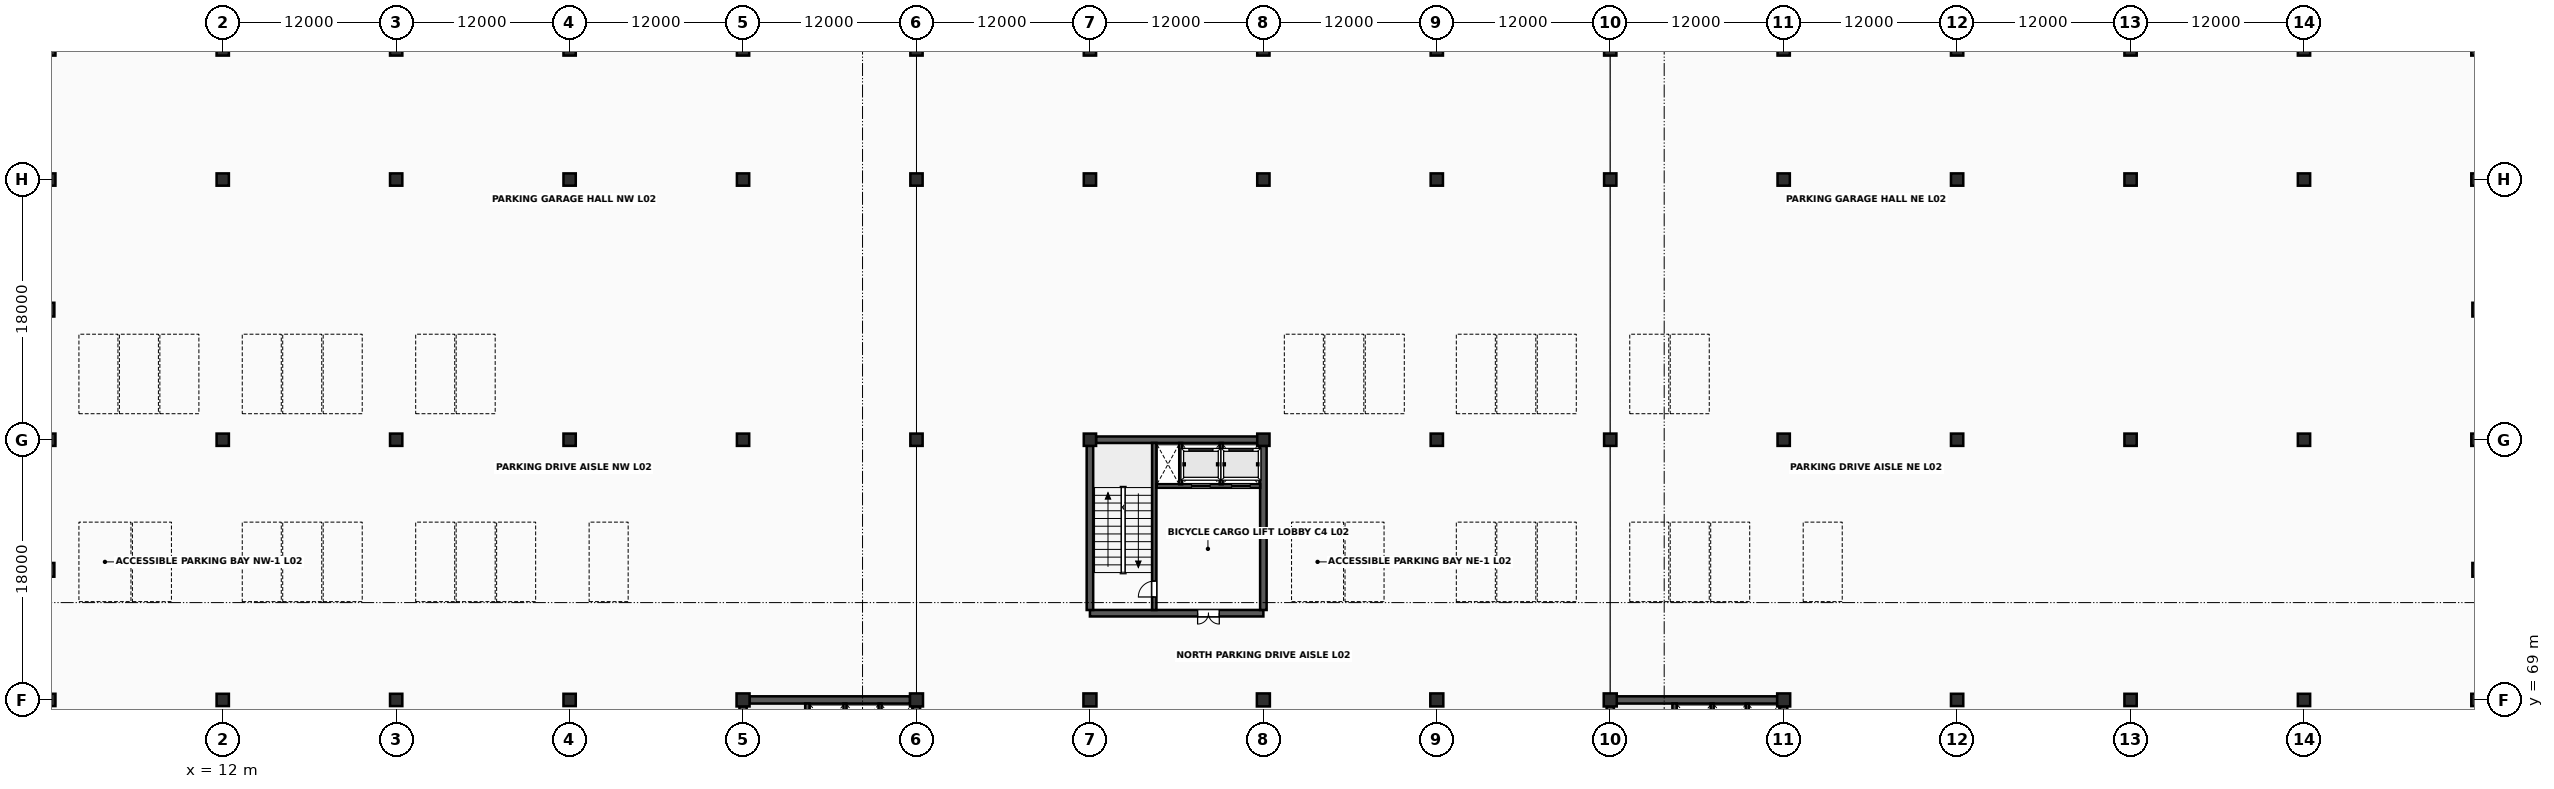
"""IFC4 building model, lengths in metres.
Left out: names, types, materials, properties, quantities, classifications, styles, units other than length and angle.
Written with IfcOpenShell. Run it as: python <this file> out.ifc"""

import sys

from ifc_helpers import new_model, si_unit, direction, frame, frame_2d, origin, origin_2d, place, context, subcontext, project, spatial, rectangle, extrude, element, fill, save


model = new_model("IFC4")
c1 = context("Model", 3, precision=1e-05, world=origin(), true_north=direction((0.0, 1.0)))
c2 = subcontext(c1, "Body", "Model", "MODEL_VIEW")
j1 = project(units=[si_unit("LENGTHUNIT", "METRE"), si_unit("PLANEANGLEUNIT", "RADIAN")], contexts=[c1])
p1 = place(None, origin())
s1 = spatial("IfcSite", under=j1, at=p1, CompositionType="ELEMENT")
p2 = place(p1, origin())
s2 = spatial("IfcBuilding", under=s1, at=p2, CompositionType="ELEMENT")
p3 = place(p2, frame((0.0, 0.0, 9.6)))
s3 = spatial("IfcBuildingStorey", under=s2, at=p3, CompositionType="ELEMENT", Elevation=9.6)
for number, where, z_axis, x_axis in (
    (1, (0.0, 69.0, 0.0), (0.0, 0.0, 1.0), (1.0, 0.0, 0.0)),
    (2, (0.0, 87.0, 0.0), (0.0, 0.0, 1.0), (1.0, 0.0, 0.0)),
    (3, (0.0, 105.0, 0.0), (0.0, 0.0, 1.0), (1.0, 0.0, 0.0)),
    (4, (0.0, 114.0, 0.0), (0.0, 0.0, 1.0), (1.0, 0.0, 0.0)),
    (5, (12.0, 69.0, 0.0), (0.0, 0.0, 1.0), (1.0, 0.0, 0.0)),
    (6, (12.0, 87.0, 0.0), (0.0, 0.0, 1.0), (1.0, 0.0, 0.0)),
    (7, (12.0, 105.0, 0.0), (0.0, 0.0, 1.0), (1.0, 0.0, 0.0)),
    (8, (12.0, 114.0, 0.0), (0.0, 0.0, 1.0), (1.0, 0.0, 0.0)),
    (9, (24.0, 69.0, 0.0), (0.0, 0.0, 1.0), (1.0, 0.0, 0.0)),
    (10, (24.0, 87.0, 0.0), (0.0, 0.0, 1.0), (1.0, 0.0, 0.0)),
    (11, (24.0, 105.0, 0.0), (0.0, 0.0, 1.0), (1.0, 0.0, 0.0)),
    (12, (24.0, 114.0, 0.0), (0.0, 0.0, 1.0), (1.0, 0.0, 0.0)),
    (13, (36.0, 69.0, 0.0), (0.0, 0.0, 1.0), (1.0, 0.0, 0.0)),
    (14, (36.0, 87.0, 0.0), (0.0, 0.0, 1.0), (1.0, 0.0, 0.0)),
    (15, (36.0, 105.0, 0.0), (0.0, 0.0, 1.0), (1.0, 0.0, 0.0)),
    (16, (36.0, 114.0, 0.0), (0.0, 0.0, 1.0), (1.0, 0.0, 0.0)),
):
    element("IfcColumn", number, at=place(p3, frame(where, z_axis=z_axis, x_axis=x_axis)), inside=s3, PredefinedType="COLUMN", context=c2, shape_type="SweptSolid", body=[
        extrude(rectangle(XDim=0.85, YDim=0.85, at=origin_2d()), origin(), (0.0, 0.0, 1.0), 3.8),
    ])
p4 = place(p3, frame((48.0, 69.0, 0.0), z_axis=(0.0, 0.0, 1.0), x_axis=(1.0, 0.0, 0.0)))
e17 = element("IfcColumn", 17, at=p4, inside=s3, PredefinedType="COLUMN", context=c2, shape_type="SweptSolid", body=[
    extrude(rectangle(XDim=0.9, YDim=0.9, at=origin_2d()), origin(), (0.0, 0.0, 1.0), 3.8),
])
for number, where, z_axis, x_axis in (
    (18, (48.0, 87.0, 0.0), (0.0, 0.0, 1.0), (1.0, 0.0, 0.0)),
    (19, (48.0, 105.0, 0.0), (0.0, 0.0, 1.0), (1.0, 0.0, 0.0)),
    (20, (48.0, 114.0, 0.0), (0.0, 0.0, 1.0), (1.0, 0.0, 0.0)),
):
    element("IfcColumn", number, at=place(p3, frame(where, z_axis=z_axis, x_axis=x_axis)), inside=s3, PredefinedType="COLUMN", context=c2, shape_type="SweptSolid", body=[
        extrude(rectangle(XDim=0.85, YDim=0.85, at=origin_2d()), origin(), (0.0, 0.0, 1.0), 3.8),
    ])
p5 = place(p3, frame((60.0, 69.0, 0.0), z_axis=(0.0, 0.0, 1.0), x_axis=(1.0, 0.0, 0.0)))
e21 = element("IfcColumn", 21, at=p5, inside=s3, PredefinedType="COLUMN", context=c2, shape_type="SweptSolid", body=[
    extrude(rectangle(XDim=0.9, YDim=0.9, at=origin_2d()), origin(), (0.0, 0.0, 1.0), 3.8),
])
for number, where, z_axis, x_axis in (
    (22, (60.0, 87.0, 0.0), (0.0, 0.0, 1.0), (1.0, 0.0, 0.0)),
    (23, (60.0, 105.0, 0.0), (0.0, 0.0, 1.0), (1.0, 0.0, 0.0)),
    (24, (60.0, 114.0, 0.0), (0.0, 0.0, 1.0), (1.0, 0.0, 0.0)),
):
    element("IfcColumn", number, at=place(p3, frame(where, z_axis=z_axis, x_axis=x_axis)), inside=s3, PredefinedType="COLUMN", context=c2, shape_type="SweptSolid", body=[
        extrude(rectangle(XDim=0.85, YDim=0.85, at=origin_2d()), origin(), (0.0, 0.0, 1.0), 3.8),
    ])
p6 = place(p3, frame((72.0, 69.0, 0.0), z_axis=(0.0, 0.0, 1.0), x_axis=(1.0, 0.0, 0.0)))
e25 = element("IfcColumn", 25, at=p6, inside=s3, PredefinedType="COLUMN", context=c2, shape_type="SweptSolid", body=[
    extrude(rectangle(XDim=0.9, YDim=0.9, at=origin_2d()), origin(), (0.0, 0.0, 1.0), 3.8),
])
for number, where, z_axis, x_axis in (
    (26, (72.0, 87.0, 0.0), (0.0, 0.0, 1.0), (1.0, 0.0, 0.0)),
    (27, (72.0, 105.0, 0.0), (0.0, 0.0, 1.0), (1.0, 0.0, 0.0)),
    (28, (72.0, 114.0, 0.0), (0.0, 0.0, 1.0), (1.0, 0.0, 0.0)),
):
    element("IfcColumn", number, at=place(p3, frame(where, z_axis=z_axis, x_axis=x_axis)), inside=s3, PredefinedType="COLUMN", context=c2, shape_type="SweptSolid", body=[
        extrude(rectangle(XDim=0.85, YDim=0.85, at=origin_2d()), origin(), (0.0, 0.0, 1.0), 3.8),
    ])
p7 = place(p3, frame((84.0, 69.0, 0.0), z_axis=(0.0, 0.0, 1.0), x_axis=(1.0, 0.0, 0.0)))
e29 = element("IfcColumn", 29, at=p7, inside=s3, PredefinedType="COLUMN", context=c2, shape_type="SweptSolid", body=[
    extrude(rectangle(XDim=0.9, YDim=0.9, at=origin_2d()), origin(), (0.0, 0.0, 1.0), 3.8),
])
for number, where, z_axis, x_axis in (
    (30, (84.0, 87.0, 0.0), (0.0, 0.0, 1.0), (1.0, 0.0, 0.0)),
    (31, (84.0, 105.0, 0.0), (0.0, 0.0, 1.0), (1.0, 0.0, 0.0)),
    (32, (84.0, 114.0, 0.0), (0.0, 0.0, 1.0), (1.0, 0.0, 0.0)),
):
    element("IfcColumn", number, at=place(p3, frame(where, z_axis=z_axis, x_axis=x_axis)), inside=s3, PredefinedType="COLUMN", context=c2, shape_type="SweptSolid", body=[
        extrude(rectangle(XDim=0.85, YDim=0.85, at=origin_2d()), origin(), (0.0, 0.0, 1.0), 3.8),
    ])
p8 = place(p3, frame((96.0, 69.0, 0.0), z_axis=(0.0, 0.0, 1.0), x_axis=(1.0, 0.0, 0.0)))
e33 = element("IfcColumn", 33, at=p8, inside=s3, PredefinedType="COLUMN", context=c2, shape_type="SweptSolid", body=[
    extrude(rectangle(XDim=0.9, YDim=0.9, at=origin_2d()), origin(), (0.0, 0.0, 1.0), 3.8),
])
for number, where, z_axis, x_axis in (
    (34, (96.0, 87.0, 0.0), (0.0, 0.0, 1.0), (1.0, 0.0, 0.0)),
    (35, (96.0, 105.0, 0.0), (0.0, 0.0, 1.0), (1.0, 0.0, 0.0)),
    (36, (96.0, 114.0, 0.0), (0.0, 0.0, 1.0), (1.0, 0.0, 0.0)),
):
    element("IfcColumn", number, at=place(p3, frame(where, z_axis=z_axis, x_axis=x_axis)), inside=s3, PredefinedType="COLUMN", context=c2, shape_type="SweptSolid", body=[
        extrude(rectangle(XDim=0.85, YDim=0.85, at=origin_2d()), origin(), (0.0, 0.0, 1.0), 3.8),
    ])
p9 = place(p3, frame((108.0, 69.0, 0.0), z_axis=(0.0, 0.0, 1.0), x_axis=(1.0, 0.0, 0.0)))
e37 = element("IfcColumn", 37, at=p9, inside=s3, PredefinedType="COLUMN", context=c2, shape_type="SweptSolid", body=[
    extrude(rectangle(XDim=0.9, YDim=0.9, at=origin_2d()), origin(), (0.0, 0.0, 1.0), 3.8),
])
for number, where, z_axis, x_axis in (
    (38, (108.0, 87.0, 0.0), (0.0, 0.0, 1.0), (1.0, 0.0, 0.0)),
    (39, (108.0, 105.0, 0.0), (0.0, 0.0, 1.0), (1.0, 0.0, 0.0)),
    (40, (108.0, 114.0, 0.0), (0.0, 0.0, 1.0), (1.0, 0.0, 0.0)),
):
    element("IfcColumn", number, at=place(p3, frame(where, z_axis=z_axis, x_axis=x_axis)), inside=s3, PredefinedType="COLUMN", context=c2, shape_type="SweptSolid", body=[
        extrude(rectangle(XDim=0.85, YDim=0.85, at=origin_2d()), origin(), (0.0, 0.0, 1.0), 3.8),
    ])
p10 = place(p3, frame((120.0, 69.0, 0.0), z_axis=(0.0, 0.0, 1.0), x_axis=(1.0, 0.0, 0.0)))
e41 = element("IfcColumn", 41, at=p10, inside=s3, PredefinedType="COLUMN", context=c2, shape_type="SweptSolid", body=[
    extrude(rectangle(XDim=0.9, YDim=0.9, at=origin_2d()), origin(), (0.0, 0.0, 1.0), 3.8),
])
for number, where, z_axis, x_axis in (
    (42, (120.0, 87.0, 0.0), (0.0, 0.0, 1.0), (1.0, 0.0, 0.0)),
    (43, (120.0, 105.0, 0.0), (0.0, 0.0, 1.0), (1.0, 0.0, 0.0)),
    (44, (120.0, 114.0, 0.0), (0.0, 0.0, 1.0), (1.0, 0.0, 0.0)),
    (45, (132.0, 69.0, 0.0), (0.0, 0.0, 1.0), (1.0, 0.0, 0.0)),
    (46, (132.0, 87.0, 0.0), (0.0, 0.0, 1.0), (1.0, 0.0, 0.0)),
    (47, (132.0, 105.0, 0.0), (0.0, 0.0, 1.0), (1.0, 0.0, 0.0)),
    (48, (132.0, 114.0, 0.0), (0.0, 0.0, 1.0), (1.0, 0.0, 0.0)),
    (49, (144.0, 69.0, 0.0), (0.0, 0.0, 1.0), (1.0, 0.0, 0.0)),
    (50, (144.0, 87.0, 0.0), (0.0, 0.0, 1.0), (1.0, 0.0, 0.0)),
    (51, (144.0, 105.0, 0.0), (0.0, 0.0, 1.0), (1.0, 0.0, 0.0)),
    (52, (144.0, 114.0, 0.0), (0.0, 0.0, 1.0), (1.0, 0.0, 0.0)),
    (53, (156.0, 69.0, 0.0), (0.0, 0.0, 1.0), (1.0, 0.0, 0.0)),
    (54, (156.0, 87.0, 0.0), (0.0, 0.0, 1.0), (1.0, 0.0, 0.0)),
    (55, (156.0, 105.0, 0.0), (0.0, 0.0, 1.0), (1.0, 0.0, 0.0)),
    (56, (156.0, 114.0, 0.0), (0.0, 0.0, 1.0), (1.0, 0.0, 0.0)),
    (57, (168.0, 69.0, 0.0), (0.0, 0.0, 1.0), (1.0, 0.0, 0.0)),
    (58, (168.0, 87.0, 0.0), (0.0, 0.0, 1.0), (1.0, 0.0, 0.0)),
    (59, (168.0, 105.0, 0.0), (0.0, 0.0, 1.0), (1.0, 0.0, 0.0)),
    (60, (168.0, 114.0, 0.0), (0.0, 0.0, 1.0), (1.0, 0.0, 0.0)),
):
    element("IfcColumn", number, at=place(p3, frame(where, z_axis=z_axis, x_axis=x_axis)), inside=s3, PredefinedType="COLUMN", context=c2, shape_type="SweptSolid", body=[
        extrude(rectangle(XDim=0.85, YDim=0.85, at=origin_2d()), origin(), (0.0, 0.0, 1.0), 3.8),
    ])
for number, where, z_axis, x_axis in (
    (61, (0.0, 78.0, 0.0), (0.0, 0.0, 1.0), (1.0, 0.0, 0.0)),
    (62, (0.0, 96.0, 0.0), (0.0, 0.0, 1.0), (1.0, 0.0, 0.0)),
    (63, (168.0, 78.0, 0.0), (0.0, 0.0, 1.0), (1.0, 0.0, 0.0)),
    (64, (168.0, 96.0, 0.0), (0.0, 0.0, 1.0), (1.0, 0.0, 0.0)),
):
    element("IfcColumn", number, at=place(p3, frame(where, z_axis=z_axis, x_axis=x_axis)), inside=s3, PredefinedType="PILASTER", context=c2, shape_type="SweptSolid", body=[
        extrude(rectangle(XDim=0.7, YDim=0.95, at=origin_2d()), origin(), (0.0, 0.0, 1.0), 3.8),
    ])
for number, where, z_axis, x_axis in (
    (65, (48.447, 69.0, 0.0), (0.0, 0.0, 1.0), (1.0, 0.0, 0.0)),
    (66, (48.0, 57.447, 0.0), (0.0, 0.0, 1.0), (0.0, 1.0, 0.0)),
    (67, (60.0, 57.447, 0.0), (0.0, 0.0, 1.0), (0.0, 1.0, 0.0)),
):
    element("IfcWall", number, at=place(p3, frame(where, z_axis=z_axis, x_axis=x_axis)), inside=s3, PredefinedType="SHEAR", context=c2, shape_type="SweptSolid", body=[
        extrude(rectangle(XDim=11.106, YDim=0.5, at=frame_2d((5.553, 0.0))), origin(), (0.0, 0.0, 1.0), 3.638),
    ])
p11 = place(p3, frame((52.45, 57.247, 0.0), z_axis=(0.0, 0.0, 1.0), x_axis=(0.0, 1.0, 0.0)))
e68 = element("IfcWall", 68, at=p11, inside=s3, PredefinedType="SHEAR", context=c2, shape_type="SweptSolid", body=[
    extrude(rectangle(XDim=11.506, YDim=0.3, at=frame_2d((5.753, 0.0))), origin(), (0.0, 0.0, 1.0), 3.638),
])
p12 = place(p11, frame((0.9, 0.0, 0.0)))
e69 = element("IfcOpeningElement", 69, at=p12, cuts=e68, PredefinedType="OPENING", context=c2, shape_type="SweptSolid", body=[
    extrude(rectangle(XDim=1.1, YDim=2.2, at=frame_2d((0.55, 1.1))), frame((0.0, 0.165, 0.0), z_axis=(0.0, -1.0, 0.0), x_axis=(1.0, 0.0, 0.0)), (0.0, 0.0, 1.0), 0.33),
])
for number, where, z_axis, x_axis in (
    (70, (55.05, 65.92, 0.0), (0.0, 0.0, 1.0), (0.0, 1.0, 0.0)),
    (71, (57.48, 65.92, 0.0), (0.0, 0.0, 1.0), (0.0, 1.0, 0.0)),
):
    element("IfcWall", number, at=place(p3, frame(where, z_axis=z_axis, x_axis=x_axis)), inside=s3, PredefinedType="SOLIDWALL", context=c2, shape_type="SweptSolid", body=[
        extrude(rectangle(XDim=2.83, YDim=0.2, at=frame_2d((1.415, 0.0))), origin(), (0.0, 0.0, 1.0), 3.628),
    ])
for number, where, z_axis, x_axis in (
    (72, (108.447, 69.0, 0.0), (0.0, 0.0, 1.0), (1.0, 0.0, 0.0)),
    (73, (108.0, 57.447, 0.0), (0.0, 0.0, 1.0), (0.0, 1.0, 0.0)),
    (74, (120.0, 57.447, 0.0), (0.0, 0.0, 1.0), (0.0, 1.0, 0.0)),
):
    element("IfcWall", number, at=place(p3, frame(where, z_axis=z_axis, x_axis=x_axis)), inside=s3, PredefinedType="SHEAR", context=c2, shape_type="SweptSolid", body=[
        extrude(rectangle(XDim=11.106, YDim=0.5, at=frame_2d((5.553, 0.0))), origin(), (0.0, 0.0, 1.0), 3.638),
    ])
p13 = place(p3, frame((112.45, 57.247, 0.0), z_axis=(0.0, 0.0, 1.0), x_axis=(0.0, 1.0, 0.0)))
e75 = element("IfcWall", 75, at=p13, inside=s3, PredefinedType="SHEAR", context=c2, shape_type="SweptSolid", body=[
    extrude(rectangle(XDim=11.506, YDim=0.3, at=frame_2d((5.753, 0.0))), origin(), (0.0, 0.0, 1.0), 3.638),
])
p14 = place(p13, frame((0.9, 0.0, 0.0)))
e76 = element("IfcOpeningElement", 76, at=p14, cuts=e75, PredefinedType="OPENING", context=c2, shape_type="SweptSolid", body=[
    extrude(rectangle(XDim=1.1, YDim=2.2, at=frame_2d((0.55, 1.1))), frame((0.0, 0.165, 0.0), z_axis=(0.0, -1.0, 0.0), x_axis=(1.0, 0.0, 0.0)), (0.0, 0.0, 1.0), 0.33),
])
for number, where, z_axis, x_axis in (
    (77, (115.05, 65.92, 0.0), (0.0, 0.0, 1.0), (0.0, 1.0, 0.0)),
    (78, (117.48, 65.92, 0.0), (0.0, 0.0, 1.0), (0.0, 1.0, 0.0)),
):
    element("IfcWall", number, at=place(p3, frame(where, z_axis=z_axis, x_axis=x_axis)), inside=s3, PredefinedType="SOLIDWALL", context=c2, shape_type="SweptSolid", body=[
        extrude(rectangle(XDim=2.83, YDim=0.2, at=frame_2d((1.415, 0.0))), origin(), (0.0, 0.0, 1.0), 3.628),
    ])
p15 = place(p3, frame((72.0, 75.0, 0.0), z_axis=(0.0, 0.0, 1.0), x_axis=(1.0, 0.0, 0.0)))
e79 = element("IfcWall", 79, at=p15, inside=s3, PredefinedType="SHEAR", context=c2, shape_type="SweptSolid", body=[
    extrude(rectangle(XDim=12.0, YDim=0.45, at=frame_2d((6.0, 0.0))), origin(), (0.0, 0.0, 1.0), 3.638),
])
p16 = place(p15, frame((7.45, 0.0, 0.0)))
e80 = element("IfcOpeningElement", 80, at=p16, cuts=e79, PredefinedType="OPENING", context=c2, shape_type="SweptSolid", body=[
    extrude(rectangle(XDim=1.5, YDim=2.25, at=frame_2d((0.75, 1.125))), frame((0.0, 0.24, 0.0), z_axis=(0.0, -1.0, 0.0), x_axis=(1.0, 0.0, 0.0)), (0.0, 0.0, 1.0), 0.48),
])
p17 = place(p3, frame((72.422, 87.0, 0.0), z_axis=(0.0, 0.0, 1.0), x_axis=(1.0, 0.0, 0.0)))
e81 = element("IfcWall", 81, at=p17, inside=s3, PredefinedType="SHEAR", context=c2, shape_type="SweptSolid", body=[
    extrude(rectangle(XDim=11.156, YDim=0.45, at=frame_2d((5.578, 0.0))), origin(), (0.0, 0.0, 1.0), 3.638),
])
for number, where, z_axis, x_axis in (
    (82, (72.0, 75.222, 0.0), (0.0, 0.0, 1.0), (0.0, 1.0, 0.0)),
    (83, (84.0, 75.222, 0.0), (0.0, 0.0, 1.0), (0.0, 1.0, 0.0)),
):
    element("IfcWall", number, at=place(p3, frame(where, z_axis=z_axis, x_axis=x_axis)), inside=s3, PredefinedType="SHEAR", context=c2, shape_type="SweptSolid", body=[
        extrude(rectangle(XDim=11.356, YDim=0.45, at=frame_2d((5.678, 0.0))), origin(), (0.0, 0.0, 1.0), 3.638),
    ])
p18 = place(p3, frame((76.45, 75.222, 0.0), z_axis=(0.0, 0.0, 1.0), x_axis=(0.0, 1.0, 0.0)))
e84 = element("IfcWall", 84, at=p18, inside=s3, PredefinedType="SHEAR", context=c2, shape_type="SweptSolid", body=[
    extrude(rectangle(XDim=11.556, YDim=0.3, at=frame_2d((5.778, 0.0))), origin(), (0.0, 0.0, 1.0), 3.638),
])
p19 = place(p18, frame((0.9, 0.0, 0.0)))
e85 = element("IfcOpeningElement", 85, at=p19, cuts=e84, PredefinedType="OPENING", context=c2, shape_type="SweptSolid", body=[
    extrude(rectangle(XDim=1.1, YDim=2.2, at=frame_2d((0.55, 1.1))), frame((0.0, 0.165, 0.0), z_axis=(0.0, -1.0, 0.0), x_axis=(1.0, 0.0, 0.0)), (0.0, 0.0, 1.0), 0.33),
])
p20 = place(p3, frame((76.597, 83.8, 0.0), z_axis=(0.0, 0.0, 1.0), x_axis=(1.0, 0.0, 0.0)))
e86 = element("IfcWall", 86, at=p20, inside=s3, PredefinedType="SOLIDWALL", context=c2, shape_type="SweptSolid", body=[
    extrude(rectangle(XDim=7.181, YDim=0.25, at=frame_2d((3.591, 0.0))), origin(), (0.0, 0.0, 1.0), 3.638),
])
p21 = place(p20, frame((2.433, 0.0, 0.0)))
e87 = element("IfcOpeningElement", 87, at=p21, cuts=e86, PredefinedType="OPENING", context=c2, shape_type="SweptSolid", body=[
    extrude(rectangle(XDim=1.3, YDim=2.28, at=frame_2d((0.65, 1.14))), frame((0.0, 0.14, 0.0), z_axis=(0.0, -1.0, 0.0), x_axis=(1.0, 0.0, 0.0)), (0.0, 0.0, 1.0), 0.28),
])
p22 = place(p20, frame((5.203, 0.0, 0.0)))
e88 = element("IfcOpeningElement", 88, at=p22, cuts=e86, PredefinedType="OPENING", context=c2, shape_type="SweptSolid", body=[
    extrude(rectangle(XDim=1.3, YDim=2.28, at=frame_2d((0.65, 1.14))), frame((0.0, 0.14, 0.0), z_axis=(0.0, -1.0, 0.0), x_axis=(1.0, 0.0, 0.0)), (0.0, 0.0, 1.0), 0.28),
])
for number, where, z_axis, x_axis in (
    (89, (78.28, 83.92, 0.0), (0.0, 0.0, 1.0), (0.0, 1.0, 0.0)),
    (90, (81.08, 83.92, 0.0), (0.0, 0.0, 1.0), (0.0, 1.0, 0.0)),
):
    element("IfcWall", number, at=place(p3, frame(where, z_axis=z_axis, x_axis=x_axis)), inside=s3, PredefinedType="SOLIDWALL", context=c2, shape_type="SweptSolid", body=[
        extrude(rectangle(XDim=2.855, YDim=0.2, at=frame_2d((1.427, 0.0))), origin(), (0.0, 0.0, 1.0), 3.628),
    ])
p23 = place(p19, origin())
e91 = element("IfcDoor", 91, at=p23, inside=s3, OperationType="SINGLE_SWING_LEFT", PredefinedType="DOOR", context=c2, shape_type="SweptSolid", body=[
    extrude(rectangle(XDim=1.1, YDim=2.2, at=frame_2d((0.55, 1.1))), frame((0.0, 0.025, 0.0), z_axis=(0.0, -1.0, 0.0), x_axis=(1.0, 0.0, 0.0)), (0.0, 0.0, 1.0), 0.05),
])
fill(e85, e91)
p24 = place(p16, origin())
e92 = element("IfcDoor", 92, at=p24, inside=s3, OperationType="DOUBLE_DOOR_SINGLE_SWING", PredefinedType="DOOR", context=c2, shape_type="SweptSolid", body=[
    extrude(rectangle(XDim=1.5, YDim=2.25, at=frame_2d((0.75, 1.125))), frame((0.0, 0.025, 0.0), z_axis=(0.0, -1.0, 0.0), x_axis=(1.0, 0.0, 0.0)), (0.0, 0.0, 1.0), 0.05),
])
fill(e80, e92)
p25 = place(p21, origin())
e93 = element("IfcDoor", 93, at=p25, inside=s3, OperationType="SLIDING_TO_LEFT", PredefinedType="USERDEFINED", context=c2, shape_type="SweptSolid", body=[
    extrude(rectangle(XDim=1.3, YDim=2.28, at=frame_2d((0.65, 1.14))), frame((0.0, 0.025, 0.0), z_axis=(0.0, -1.0, 0.0), x_axis=(1.0, 0.0, 0.0)), (0.0, 0.0, 1.0), 0.05),
])
fill(e87, e93)
p26 = place(p22, origin())
e94 = element("IfcDoor", 94, at=p26, inside=s3, OperationType="SLIDING_TO_LEFT", PredefinedType="USERDEFINED", context=c2, shape_type="SweptSolid", body=[
    extrude(rectangle(XDim=1.3, YDim=2.28, at=frame_2d((0.65, 1.14))), frame((0.0, 0.025, 0.0), z_axis=(0.0, -1.0, 0.0), x_axis=(1.0, 0.0, 0.0)), (0.0, 0.0, 1.0), 0.05),
])
fill(e88, e94)
save(model, sys.argv[1])
